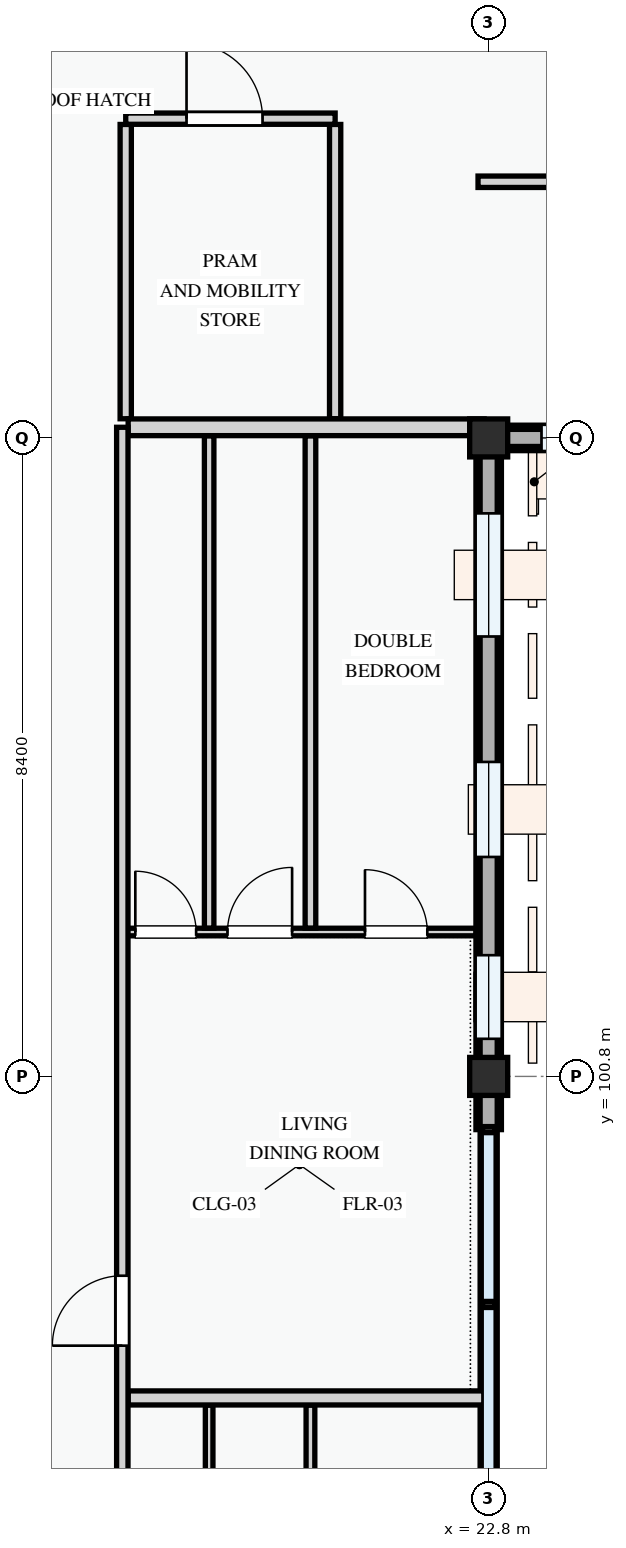
"""IFC4 building model, lengths in metres.
Left out: names, types, materials, properties, quantities, classifications, styles, units other than length and angle.
Written with IfcOpenShell. Run it as: python <this file> out.ifc"""

import sys

from ifc_helpers import new_model, si_unit, direction, frame, frame_2d, origin, origin_2d, place, context, subcontext, project, spatial, rectangle, extrude, element, fill, save


model = new_model("IFC4")
c1 = context("Model", 3, precision=1e-05, world=origin(), true_north=direction((0.0, 1.0)))
c2 = subcontext(c1, "Body", "Model", "MODEL_VIEW")
j1 = project(units=[si_unit("LENGTHUNIT", "METRE"), si_unit("PLANEANGLEUNIT", "RADIAN")], contexts=[c1])
p1 = place(None, origin())
s1 = spatial("IfcSite", under=j1, at=p1, CompositionType="ELEMENT")
p2 = place(p1, origin())
s2 = spatial("IfcBuilding", under=s1, at=p2, CompositionType="ELEMENT")
p3 = place(p2, frame((0.0, 0.0, 51.0)))
s3 = spatial("IfcBuildingStorey", under=s2, at=p3, CompositionType="ELEMENT", Elevation=51.0)
for number, where, z_axis, x_axis in (
    (1, (22.8, 100.8, 0.0), (0.0, 0.0, 1.0), (1.0, 0.0, 0.0)),
    (2, (22.8, 109.2, 0.0), (0.0, 0.0, 1.0), (1.0, 0.0, 0.0)),
):
    element("IfcColumn", number, at=place(p3, frame(where, z_axis=z_axis, x_axis=x_axis)), inside=s3, PredefinedType="COLUMN", context=c2, shape_type="SweptSolid", body=[
        extrude(rectangle(XDim=0.5, YDim=0.5, at=origin_2d()), origin(), (0.0, 0.0, 1.0), 3.3),
    ])
p4 = place(p3, frame((22.8, 109.2, 0.0), z_axis=(0.0, 0.0, 1.0), x_axis=(1.0, 0.0, 0.0)))
e3 = element("IfcWall", 3, at=p4, inside=s3, PredefinedType="STANDARD", context=c2, shape_type="SweptSolid", body=[
    extrude(rectangle(XDim=6.0, YDim=0.335, at=frame_2d((3.0, 0.0))), origin(), (0.0, 0.0, 1.0), 2.545),
])
p5 = place(p4, frame((0.695, 0.0, 0.78)))
e4 = element("IfcOpeningElement", 4, at=p5, cuts=e3, PredefinedType="OPENING", context=c2, shape_type="SweptSolid", body=[
    extrude(rectangle(XDim=1.15, YDim=1.25, at=frame_2d((0.575, 0.625))), frame((0.0, 0.177, 0.0), z_axis=(0.0, -1.0, 0.0), x_axis=(1.0, 0.0, 0.0)), (0.0, 0.0, 1.0), 0.355),
])
p6 = place(p4, frame((2.87, 0.0, 0.78)))
e5 = element("IfcOpeningElement", 5, at=p6, cuts=e3, PredefinedType="OPENING", context=c2, shape_type="SweptSolid", body=[
    extrude(rectangle(XDim=2.42, YDim=1.52, at=frame_2d((1.21, 0.76))), frame((0.0, 0.177, 0.0), z_axis=(0.0, -1.0, 0.0), x_axis=(1.0, 0.0, 0.0)), (0.0, 0.0, 1.0), 0.355),
])
p7 = place(p3, frame((22.8, 100.1, 0.0), z_axis=(0.0, 0.0, 1.0), x_axis=(0.0, 1.0, 0.0)))
e6 = element("IfcWall", 6, at=p7, inside=s3, PredefinedType="STANDARD", context=c2, shape_type="SweptSolid", body=[
    extrude(rectangle(XDim=0.7, YDim=0.335, at=frame_2d((0.35, 0.0))), origin(), (0.0, 0.0, 1.0), 2.595),
])
p8 = place(p3, frame((22.8, 100.8, 0.0), z_axis=(0.0, 0.0, 1.0), x_axis=(0.0, 1.0, 0.0)))
e7 = element("IfcWall", 7, at=p8, inside=s3, PredefinedType="STANDARD", context=c2, shape_type="SweptSolid", body=[
    extrude(rectangle(XDim=8.4, YDim=0.335, at=frame_2d((4.2, 0.0))), origin(), (0.0, 0.0, 1.0), 2.445),
])
p9 = place(p8, frame((0.495, 0.0, 0.78)))
e8 = element("IfcOpeningElement", 8, at=p9, cuts=e7, PredefinedType="OPENING", context=c2, shape_type="SweptSolid", body=[
    extrude(rectangle(XDim=1.1, YDim=1.3, at=frame_2d((0.55, 0.65))), frame((0.0, 0.177, 0.0), z_axis=(0.0, -1.0, 0.0), x_axis=(1.0, 0.0, 0.0)), (0.0, 0.0, 1.0), 0.355),
])
p10 = place(p8, frame((2.887, 0.0, 0.78)))
e9 = element("IfcOpeningElement", 9, at=p10, cuts=e7, PredefinedType="OPENING", context=c2, shape_type="SweptSolid", body=[
    extrude(rectangle(XDim=1.25, YDim=1.45, at=frame_2d((0.625, 0.725))), frame((0.0, 0.177, 0.0), z_axis=(0.0, -1.0, 0.0), x_axis=(1.0, 0.0, 0.0)), (0.0, 0.0, 1.0), 0.355),
])
p11 = place(p8, frame((5.787, 0.0, 0.78)))
e10 = element("IfcOpeningElement", 10, at=p11, cuts=e7, PredefinedType="OPENING", context=c2, shape_type="SweptSolid", body=[
    extrude(rectangle(XDim=1.62, YDim=1.38, at=frame_2d((0.81, 0.69))), frame((0.0, 0.177, 0.0), z_axis=(0.0, -1.0, 0.0), x_axis=(1.0, 0.0, 0.0)), (0.0, 0.0, 1.0), 0.355),
])
p12 = place(p3, frame((22.8, 109.2, 3.3), z_axis=(0.0, 0.0, 1.0), x_axis=(1.0, 0.0, 0.0)))
e11 = element("IfcWall", 11, at=p12, inside=s3, PredefinedType="PARAPET", context=c2, shape_type="SweptSolid", body=[
    extrude(rectangle(XDim=14.4, YDim=0.225, at=frame_2d((7.2, 0.0))), origin(), (0.0, 0.0, 1.0), 1.15),
])
p13 = place(p3, frame((22.8, 86.4, 3.3), z_axis=(0.0, 0.0, 1.0), x_axis=(0.0, 1.0, 0.0)))
e12 = element("IfcWall", 12, at=p13, inside=s3, PredefinedType="PARAPET", context=c2, shape_type="SweptSolid", body=[
    extrude(rectangle(XDim=22.8, YDim=0.225, at=frame_2d((11.4, 0.0))), origin(), (0.0, 0.0, 1.0), 1.15),
])
for number, where, z_axis, x_axis in (
    (13, (18.025, 113.324, 0.0), (0.0, 0.0, 1.0), (0.0, -1.0, 0.0)),
    (14, (20.78, 113.324, 0.0), (0.0, 0.0, 1.0), (0.0, -1.0, 0.0)),
):
    element("IfcWall", number, at=place(p3, frame(where, z_axis=z_axis, x_axis=x_axis)), inside=s3, PredefinedType="PARTITIONING", context=c2, shape_type="SweptSolid", body=[
        extrude(rectangle(XDim=3.872, YDim=0.148, at=frame_2d((1.936, 0.0))), origin(), (0.0, 0.0, 1.0), 3.0),
    ])
p14 = place(p3, frame((18.025, 113.4, 0.0), z_axis=(0.0, 0.0, 1.0), x_axis=(1.0, 0.0, 0.0)))
e15 = element("IfcWall", 15, at=p14, inside=s3, PredefinedType="PARTITIONING", context=c2, shape_type="SweptSolid", body=[
    extrude(rectangle(XDim=2.755, YDim=0.148, at=frame_2d((1.377, 0.0))), origin(), (0.0, 0.0, 1.0), 3.0),
])
p15 = place(p14, frame((0.8, 0.0, 0.0)))
e16 = element("IfcOpeningElement", 16, at=p15, cuts=e15, PredefinedType="OPENING", context=c2, shape_type="SweptSolid", body=[
    extrude(rectangle(XDim=1.0, YDim=2.15, at=frame_2d((0.5, 1.075))), frame((0.0, 0.084, 0.0), z_axis=(0.0, -1.0, 0.0), x_axis=(1.0, 0.0, 0.0)), (0.0, 0.0, 1.0), 0.168),
])
p16 = place(p3, frame((22.66, 112.57, 0.0), z_axis=(0.0, 0.0, 1.0), x_axis=(1.0, 0.0, 0.0)))
e17 = element("IfcWall", 17, at=p16, inside=s3, PredefinedType="PARTITIONING", context=c2, shape_type="SweptSolid", body=[
    extrude(rectangle(XDim=2.406, YDim=0.15, at=frame_2d((1.203, 0.0))), origin(), (0.0, 0.0, 1.0), 3.0),
])
p17 = place(p3, frame((20.455, 91.377, 0.0), z_axis=(0.0, 0.0, 1.0), x_axis=(0.0, 1.0, 0.0)))
e18 = element("IfcWall", 18, at=p17, inside=s3, PredefinedType="PARTITIONING", context=c2, shape_type="SweptSolid", body=[
    extrude(rectangle(XDim=5.098, YDim=0.115, at=frame_2d((2.549, 0.0))), origin(), (0.0, 0.0, 1.0), 3.0),
])
p18 = place(p3, frame((19.122, 91.377, 0.0), z_axis=(0.0, 0.0, 1.0), x_axis=(0.0, 1.0, 0.0)))
e19 = element("IfcWall", 19, at=p18, inside=s3, PredefinedType="PARTITIONING", context=c2, shape_type="SweptSolid", body=[
    extrude(rectangle(XDim=5.098, YDim=0.1, at=frame_2d((2.549, 0.0))), origin(), (0.0, 0.0, 1.0), 3.0),
])
p19 = place(p3, frame((17.98, 102.7, 0.0), z_axis=(0.0, 0.0, 1.0), x_axis=(1.0, 0.0, 0.0)))
e20 = element("IfcWall", 20, at=p19, inside=s3, PredefinedType="PARTITIONING", context=c2, shape_type="SweptSolid", body=[
    extrude(rectangle(XDim=4.651, YDim=0.1, at=frame_2d((2.325, 0.0))), origin(), (0.0, 0.0, 1.0), 3.0),
])
p20 = place(p19, frame((0.171, 0.0, 0.0)))
e21 = element("IfcOpeningElement", 21, at=p20, cuts=e20, PredefinedType="OPENING", context=c2, shape_type="SweptSolid", body=[
    extrude(rectangle(XDim=0.8, YDim=2.1, at=frame_2d((0.4, 1.05))), frame((0.0, 0.06, 0.0), z_axis=(0.0, -1.0, 0.0), x_axis=(1.0, 0.0, 0.0)), (0.0, 0.0, 1.0), 0.12),
])
p21 = place(p19, frame((1.384, 0.0, 0.0)))
e22 = element("IfcOpeningElement", 22, at=p21, cuts=e20, PredefinedType="OPENING", context=c2, shape_type="SweptSolid", body=[
    extrude(rectangle(XDim=0.85, YDim=2.1, at=frame_2d((0.425, 1.05))), frame((0.0, 0.06, 0.0), z_axis=(0.0, -1.0, 0.0), x_axis=(1.0, 0.0, 0.0)), (0.0, 0.0, 1.0), 0.12),
])
p22 = place(p19, frame((3.193, 0.0, 0.0)))
e23 = element("IfcOpeningElement", 23, at=p22, cuts=e20, PredefinedType="OPENING", context=c2, shape_type="SweptSolid", body=[
    extrude(rectangle(XDim=0.82, YDim=2.08, at=frame_2d((0.41, 1.04))), frame((0.0, 0.06, 0.0), z_axis=(0.0, -1.0, 0.0), x_axis=(1.0, 0.0, 0.0)), (0.0, 0.0, 1.0), 0.12),
])
p23 = place(p3, frame((20.455, 102.752, 0.0), z_axis=(0.0, 0.0, 1.0), x_axis=(0.0, 1.0, 0.0)))
e24 = element("IfcWall", 24, at=p23, inside=s3, PredefinedType="PARTITIONING", context=c2, shape_type="SweptSolid", body=[
    extrude(rectangle(XDim=6.476, YDim=0.14, at=frame_2d((3.238, 0.0))), origin(), (0.0, 0.0, 1.0), 3.0),
])
p24 = place(p3, frame((19.122, 102.752, 0.0), z_axis=(0.0, 0.0, 1.0), x_axis=(0.0, 1.0, 0.0)))
e25 = element("IfcWall", 25, at=p24, inside=s3, PredefinedType="PARTITIONING", context=c2, shape_type="SweptSolid", body=[
    extrude(rectangle(XDim=6.476, YDim=0.125, at=frame_2d((3.238, 0.0))), origin(), (0.0, 0.0, 1.0), 3.0),
])
p25 = place(p3, frame((18.057, 96.57, 0.0), z_axis=(0.0, 0.0, 1.0), x_axis=(1.0, 0.0, 0.0)))
e26 = element("IfcWall", 26, at=p25, inside=s3, PredefinedType="PARTITIONING", context=c2, shape_type="SweptSolid", body=[
    extrude(rectangle(XDim=4.683, YDim=0.185, at=frame_2d((2.342, 0.0))), origin(), (0.0, 0.0, 1.0), 3.0),
])
p26 = place(p3, frame((18.057, 109.34, 0.0), z_axis=(0.0, 0.0, 1.0), x_axis=(1.0, 0.0, 0.0)))
e27 = element("IfcWall", 27, at=p26, inside=s3, PredefinedType="PARTITIONING", context=c2, shape_type="SweptSolid", body=[
    extrude(rectangle(XDim=4.683, YDim=0.22, at=frame_2d((2.342, 0.0))), origin(), (0.0, 0.0, 1.0), 2.395),
])
p27 = place(p3, frame((17.98, 86.46, 0.0), z_axis=(0.0, 0.0, 1.0), x_axis=(0.0, 1.0, 0.0)))
e28 = element("IfcWall", 28, at=p27, inside=s3, PredefinedType="PARTITIONING", context=c2, shape_type="SweptSolid", body=[
    extrude(rectangle(XDim=22.88, YDim=0.15, at=frame_2d((11.44, 0.0))), origin(), (0.0, 0.0, 1.0), 3.0),
])
p28 = place(p27, frame((3.643, 0.0, 0.0)))
e29 = element("IfcOpeningElement", 29, at=p28, cuts=e28, PredefinedType="OPENING", context=c2, shape_type="SweptSolid", body=[
    extrude(rectangle(XDim=0.96, YDim=2.12, at=frame_2d((0.48, 1.06))), frame((0.0, 0.085, 0.0), z_axis=(0.0, -1.0, 0.0), x_axis=(1.0, 0.0, 0.0)), (0.0, 0.0, 1.0), 0.17),
])
p29 = place(p27, frame((10.798, 0.0, 0.0)))
e30 = element("IfcOpeningElement", 30, at=p29, cuts=e28, PredefinedType="OPENING", context=c2, shape_type="SweptSolid", body=[
    extrude(rectangle(XDim=0.92, YDim=2.1, at=frame_2d((0.46, 1.05))), frame((0.0, 0.085, 0.0), z_axis=(0.0, -1.0, 0.0), x_axis=(1.0, 0.0, 0.0)), (0.0, 0.0, 1.0), 0.17),
])
p30 = place(p5, origin())
e31 = element("IfcWindow", 31, at=p30, inside=s3, PartitioningType="SINGLE_PANEL", PredefinedType="WINDOW", context=c2, shape_type="SweptSolid", body=[
    extrude(rectangle(XDim=1.15, YDim=1.25, at=frame_2d((0.575, 0.625))), frame((0.0, 0.03, 0.0), z_axis=(0.0, -1.0, 0.0), x_axis=(1.0, 0.0, 0.0)), (0.0, 0.0, 1.0), 0.06),
])
fill(e4, e31)
p31 = place(p9, origin())
e32 = element("IfcWindow", 32, at=p31, inside=s3, PartitioningType="SINGLE_PANEL", PredefinedType="WINDOW", context=c2, shape_type="SweptSolid", body=[
    extrude(rectangle(XDim=1.1, YDim=1.3, at=frame_2d((0.55, 0.65))), frame((0.0, 0.03, 0.0), z_axis=(0.0, -1.0, 0.0), x_axis=(1.0, 0.0, 0.0)), (0.0, 0.0, 1.0), 0.06),
])
fill(e8, e32)
p32 = place(p10, origin())
e33 = element("IfcWindow", 33, at=p32, inside=s3, PartitioningType="SINGLE_PANEL", PredefinedType="WINDOW", context=c2, shape_type="SweptSolid", body=[
    extrude(rectangle(XDim=1.25, YDim=1.45, at=frame_2d((0.625, 0.725))), frame((0.0, 0.03, 0.0), z_axis=(0.0, -1.0, 0.0), x_axis=(1.0, 0.0, 0.0)), (0.0, 0.0, 1.0), 0.06),
])
fill(e9, e33)
p33 = place(p11, origin())
e34 = element("IfcWindow", 34, at=p33, inside=s3, PartitioningType="DOUBLE_PANEL_VERTICAL", PredefinedType="WINDOW", context=c2, shape_type="SweptSolid", body=[
    extrude(rectangle(XDim=1.62, YDim=1.38, at=frame_2d((0.81, 0.69))), frame((0.0, 0.03, 0.0), z_axis=(0.0, -1.0, 0.0), x_axis=(1.0, 0.0, 0.0)), (0.0, 0.0, 1.0), 0.06),
])
fill(e10, e34)
p34 = place(p15, origin())
e35 = element("IfcDoor", 35, at=p34, inside=s3, OperationType="SINGLE_SWING_LEFT", PredefinedType="DOOR", context=c2, shape_type="SweptSolid", body=[
    extrude(rectangle(XDim=1.0, YDim=2.15, at=frame_2d((0.5, 1.075))), frame((0.0, 0.025, 0.0), z_axis=(0.0, -1.0, 0.0), x_axis=(1.0, 0.0, 0.0)), (0.0, 0.0, 1.0), 0.05),
])
fill(e16, e35)
p35 = place(p20, origin())
e36 = element("IfcDoor", 36, at=p35, inside=s3, OperationType="SINGLE_SWING_LEFT", PredefinedType="DOOR", context=c2, shape_type="SweptSolid", body=[
    extrude(rectangle(XDim=0.8, YDim=2.1, at=frame_2d((0.4, 1.05))), frame((0.0, 0.025, 0.0), z_axis=(0.0, -1.0, 0.0), x_axis=(1.0, 0.0, 0.0)), (0.0, 0.0, 1.0), 0.05),
])
fill(e21, e36)
p36 = place(p21, origin())
e37 = element("IfcDoor", 37, at=p36, inside=s3, OperationType="SINGLE_SWING_RIGHT", PredefinedType="DOOR", context=c2, shape_type="SweptSolid", body=[
    extrude(rectangle(XDim=0.85, YDim=2.1, at=frame_2d((0.425, 1.05))), frame((0.0, 0.025, 0.0), z_axis=(0.0, -1.0, 0.0), x_axis=(1.0, 0.0, 0.0)), (0.0, 0.0, 1.0), 0.05),
])
fill(e22, e37)
p37 = place(p22, origin())
e38 = element("IfcDoor", 38, at=p37, inside=s3, OperationType="SINGLE_SWING_LEFT", PredefinedType="DOOR", context=c2, shape_type="SweptSolid", body=[
    extrude(rectangle(XDim=0.82, YDim=2.08, at=frame_2d((0.41, 1.04))), frame((0.0, 0.025, 0.0), z_axis=(0.0, -1.0, 0.0), x_axis=(1.0, 0.0, 0.0)), (0.0, 0.0, 1.0), 0.05),
])
fill(e23, e38)
p38 = place(p29, origin())
e39 = element("IfcDoor", 39, at=p38, inside=s3, OperationType="SINGLE_SWING_LEFT", PredefinedType="DOOR", context=c2, shape_type="SweptSolid", body=[
    extrude(rectangle(XDim=0.92, YDim=2.1, at=frame_2d((0.46, 1.05))), frame((0.0, 0.025, 0.0), z_axis=(0.0, -1.0, 0.0), x_axis=(1.0, 0.0, 0.0)), (0.0, 0.0, 1.0), 0.05),
])
fill(e30, e39)
save(model, sys.argv[1])
